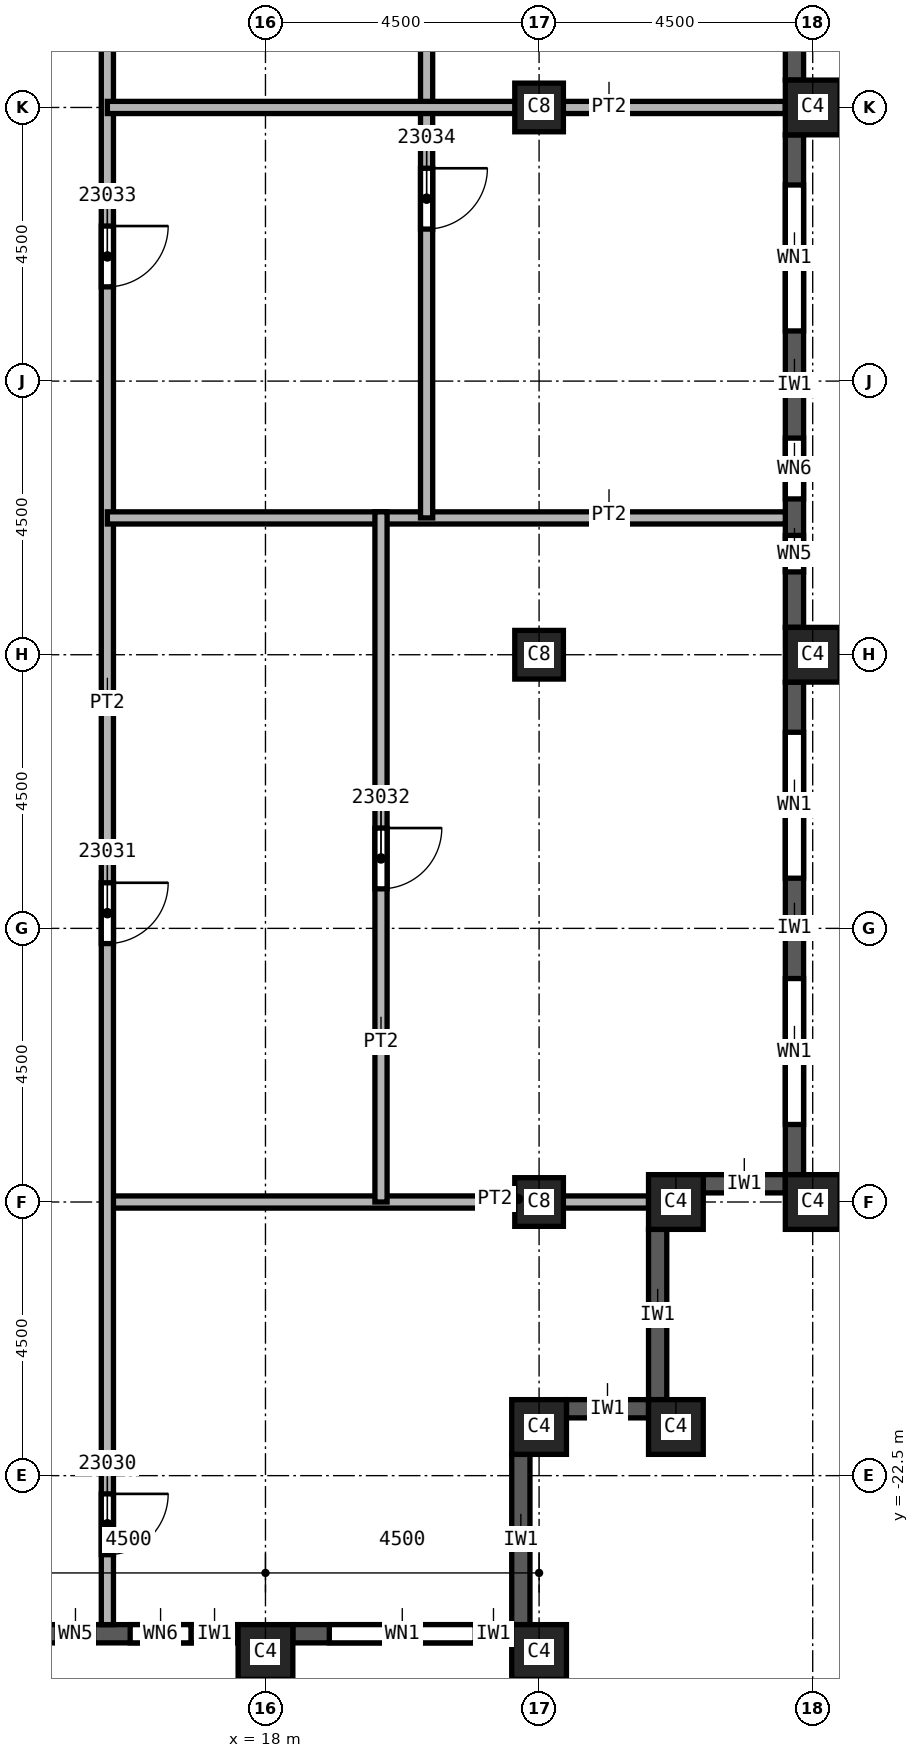
"""IFC4 building model, lengths in metres.
Left out: names, types, materials, properties, quantities, classifications, styles, units other than length and angle.
Written with IfcOpenShell. Run it as: python <this file> out.ifc"""

import sys

from ifc_helpers import new_model, si_unit, direction, frame, frame_2d, origin, origin_2d, place, context, subcontext, project, spatial, rectangle, extrude, element, fill, save


model = new_model("IFC4")
c1 = context("Model", 3, precision=1e-05, world=origin(), true_north=direction((0.0, 1.0)))
c2 = subcontext(c1, "Body", "Model", "MODEL_VIEW")
j1 = project(units=[si_unit("LENGTHUNIT", "METRE"), si_unit("PLANEANGLEUNIT", "RADIAN")], contexts=[c1])
p1 = place(None, origin())
s1 = spatial("IfcSite", under=j1, at=p1, CompositionType="ELEMENT")
p2 = place(p1, origin())
s2 = spatial("IfcBuilding", under=s1, at=p2, CompositionType="ELEMENT")
p3 = place(p2, frame((0.0, 0.0, 326.0)))
s3 = spatial("IfcBuildingStorey", under=s2, at=p3, CompositionType="ELEMENT", Elevation=326.0)
for number, where, z_axis, x_axis in (
    (1, (22.5, 0.0, 0.0), (0.0, 0.0, 1.0), (1.0, 0.0, 0.0)),
    (2, (22.5, -9.0, 0.0), (0.0, 0.0, 1.0), (1.0, 0.0, 0.0)),
    (3, (22.5, -18.0, 0.0), (0.0, 0.0, 1.0), (1.0, 0.0, 0.0)),
):
    element("IfcColumn", number, at=place(p3, frame(where, z_axis=z_axis, x_axis=x_axis)), inside=s3, PredefinedType="COLUMN", context=c2, shape_type="SweptSolid", body=[
        extrude(rectangle(XDim=0.8, YDim=0.8, at=origin_2d()), origin(), (0.0, 0.0, 1.0), 3.74),
    ])
for number, where, z_axis, x_axis in (
    (4, (27.0, 0.0, 0.0), (0.0, 0.0, 1.0), (0.0, 1.0, 0.0)),
    (5, (27.0, -9.0, 0.0), (0.0, 0.0, 1.0), (0.0, 1.0, 0.0)),
    (6, (27.0, -18.0, 0.0), (0.0, 0.0, 1.0), (0.0, 1.0, 0.0)),
    (7, (18.0, -25.4, 0.0), (0.0, 0.0, 1.0), (1.0, 0.0, 0.0)),
    (8, (22.5, -25.4, 0.0), (0.0, 0.0, 1.0), (1.0, 0.0, 0.0)),
    (9, (22.5, -21.7, 0.0), (0.0, 0.0, 1.0), (1.0, 0.0, 0.0)),
    (10, (24.75, -21.7, 0.0), (0.0, 0.0, 1.0), (1.0, 0.0, 0.0)),
    (11, (24.75, -18.0, 0.0), (0.0, 0.0, 1.0), (1.0, 0.0, 0.0)),
):
    element("IfcColumn", number, at=place(p3, frame(where, z_axis=z_axis, x_axis=x_axis)), inside=s3, PredefinedType="COLUMN", context=c2, shape_type="SweptSolid", body=[
        extrude(rectangle(XDim=0.9, YDim=0.9, at=origin_2d()), origin(), (0.0, 0.0, 1.0), 3.74),
    ])
p4 = place(p3, frame((13.95, -25.1, 0.0), z_axis=(0.0, 0.0, 1.0), x_axis=(1.0, 0.0, 0.0)))
e12 = element("IfcWall", 12, at=p4, inside=s3, PredefinedType="SOLIDWALL", context=c2, shape_type="SweptSolid", body=[
    extrude(rectangle(XDim=3.6, YDim=0.3, at=frame_2d((1.8, 0.0))), origin(), (0.0, 0.0, 1.0), 3.14),
])
p5 = place(p4, frame((0.625, 0.0, 0.8)))
e13 = element("IfcOpeningElement", 13, at=p5, cuts=e12, PredefinedType="OPENING", context=c2, shape_type="SweptSolid", body=[
    extrude(rectangle(XDim=0.6, YDim=1.95, at=frame_2d((0.3, 0.975))), frame((0.0, 0.15, 0.0), z_axis=(0.0, -1.0, 0.0), x_axis=(1.0, 0.0, 0.0)), (0.0, 0.0, 1.0), 0.3),
])
p6 = place(p4, frame((1.825, 0.0, 0.8)))
e14 = element("IfcOpeningElement", 14, at=p6, cuts=e12, PredefinedType="OPENING", context=c2, shape_type="SweptSolid", body=[
    extrude(rectangle(XDim=1.0, YDim=1.95, at=frame_2d((0.5, 0.975))), frame((0.0, 0.15, 0.0), z_axis=(0.0, -1.0, 0.0), x_axis=(1.0, 0.0, 0.0)), (0.0, 0.0, 1.0), 0.3),
])
p7 = place(p3, frame((18.45, -25.1, 0.0), z_axis=(0.0, 0.0, 1.0), x_axis=(1.0, 0.0, 0.0)))
e15 = element("IfcWall", 15, at=p7, inside=s3, PredefinedType="SOLIDWALL", context=c2, shape_type="SweptSolid", body=[
    extrude(rectangle(XDim=3.6, YDim=0.3, at=frame_2d((1.8, 0.0))), origin(), (0.0, 0.0, 1.0), 3.14),
])
p8 = place(p7, frame((0.6, 0.0, 0.8)))
e16 = element("IfcOpeningElement", 16, at=p8, cuts=e15, PredefinedType="OPENING", context=c2, shape_type="SweptSolid", body=[
    extrude(rectangle(XDim=2.4, YDim=1.95, at=frame_2d((1.2, 0.975))), frame((0.0, 0.15, 0.0), z_axis=(0.0, -1.0, 0.0), x_axis=(1.0, 0.0, 0.0)), (0.0, 0.0, 1.0), 0.3),
])
p9 = place(p3, frame((22.2, -24.95, 0.0), z_axis=(0.0, 0.0, 1.0), x_axis=(0.0, 1.0, 0.0)))
e17 = element("IfcWall", 17, at=p9, inside=s3, PredefinedType="SOLIDWALL", context=c2, shape_type="SweptSolid", body=[
    extrude(rectangle(XDim=2.8, YDim=0.3, at=frame_2d((1.4, 0.0))), origin(), (0.0, 0.0, 1.0), 3.14),
])
p10 = place(p3, frame((22.95, -21.4, 0.0), z_axis=(0.0, 0.0, 1.0), x_axis=(1.0, 0.0, 0.0)))
e18 = element("IfcWall", 18, at=p10, inside=s3, PredefinedType="SOLIDWALL", context=c2, shape_type="SweptSolid", body=[
    extrude(rectangle(XDim=1.35, YDim=0.3, at=frame_2d((0.675, 0.0))), origin(), (0.0, 0.0, 1.0), 3.14),
])
p11 = place(p3, frame((24.45, -21.25, 0.0), z_axis=(0.0, 0.0, 1.0), x_axis=(0.0, 1.0, 0.0)))
e19 = element("IfcWall", 19, at=p11, inside=s3, PredefinedType="SOLIDWALL", context=c2, shape_type="SweptSolid", body=[
    extrude(rectangle(XDim=2.8, YDim=0.3, at=frame_2d((1.4, 0.0))), origin(), (0.0, 0.0, 1.0), 3.14),
])
p12 = place(p3, frame((25.2, -17.7, 0.0), z_axis=(0.0, 0.0, 1.0), x_axis=(1.0, 0.0, 0.0)))
e20 = element("IfcWall", 20, at=p12, inside=s3, PredefinedType="SOLIDWALL", context=c2, shape_type="SweptSolid", body=[
    extrude(rectangle(XDim=1.35, YDim=0.3, at=frame_2d((0.675, 0.0))), origin(), (0.0, 0.0, 1.0), 3.14),
])
p13 = place(p3, frame((26.7, -17.55, 0.0), z_axis=(0.0, 0.0, 1.0), x_axis=(0.0, 1.0, 0.0)))
e21 = element("IfcWall", 21, at=p13, inside=s3, PredefinedType="SOLIDWALL", context=c2, shape_type="SweptSolid", body=[
    extrude(rectangle(XDim=8.1, YDim=0.3, at=frame_2d((4.05, 0.0))), origin(), (0.0, 0.0, 1.0), 3.14),
])
p14 = place(p13, frame((0.825, 0.0, 0.8)))
e22 = element("IfcOpeningElement", 22, at=p14, cuts=e21, PredefinedType="OPENING", context=c2, shape_type="SweptSolid", body=[
    extrude(rectangle(XDim=2.4, YDim=1.95, at=frame_2d((1.2, 0.975))), frame((0.0, 0.15, 0.0), z_axis=(0.0, -1.0, 0.0), x_axis=(1.0, 0.0, 0.0)), (0.0, 0.0, 1.0), 0.3),
])
p15 = place(p13, frame((4.875, 0.0, 0.8)))
e23 = element("IfcOpeningElement", 23, at=p15, cuts=e21, PredefinedType="OPENING", context=c2, shape_type="SweptSolid", body=[
    extrude(rectangle(XDim=2.4, YDim=1.95, at=frame_2d((1.2, 0.975))), frame((0.0, 0.15, 0.0), z_axis=(0.0, -1.0, 0.0), x_axis=(1.0, 0.0, 0.0)), (0.0, 0.0, 1.0), 0.3),
])
p16 = place(p3, frame((26.7, -8.55, 0.0), z_axis=(0.0, 0.0, 1.0), x_axis=(0.0, 1.0, 0.0)))
e24 = element("IfcWall", 24, at=p16, inside=s3, PredefinedType="SOLIDWALL", context=c2, shape_type="SweptSolid", body=[
    extrude(rectangle(XDim=8.1, YDim=0.3, at=frame_2d((4.05, 0.0))), origin(), (0.0, 0.0, 1.0), 3.14),
])
p17 = place(p16, frame((4.875, 0.0, 0.8)))
e25 = element("IfcOpeningElement", 25, at=p17, cuts=e24, PredefinedType="OPENING", context=c2, shape_type="SweptSolid", body=[
    extrude(rectangle(XDim=2.4, YDim=1.95, at=frame_2d((1.2, 0.975))), frame((0.0, 0.15, 0.0), z_axis=(0.0, -1.0, 0.0), x_axis=(1.0, 0.0, 0.0)), (0.0, 0.0, 1.0), 0.3),
])
p18 = place(p16, frame((0.913, 0.0, 0.8)))
e26 = element("IfcOpeningElement", 26, at=p18, cuts=e24, PredefinedType="OPENING", context=c2, shape_type="SweptSolid", body=[
    extrude(rectangle(XDim=0.6, YDim=1.95, at=frame_2d((0.3, 0.975))), frame((0.0, 0.15, 0.0), z_axis=(0.0, -1.0, 0.0), x_axis=(1.0, 0.0, 0.0)), (0.0, 0.0, 1.0), 0.3),
])
p19 = place(p16, frame((2.113, 0.0, 0.8)))
e27 = element("IfcOpeningElement", 27, at=p19, cuts=e24, PredefinedType="OPENING", context=c2, shape_type="SweptSolid", body=[
    extrude(rectangle(XDim=1.0, YDim=1.95, at=frame_2d((0.5, 0.975))), frame((0.0, 0.15, 0.0), z_axis=(0.0, -1.0, 0.0), x_axis=(1.0, 0.0, 0.0)), (0.0, 0.0, 1.0), 0.3),
])
p20 = place(p3, frame((26.7, 0.45, 0.0), z_axis=(0.0, 0.0, 1.0), x_axis=(0.0, 1.0, 0.0)))
e28 = element("IfcWall", 28, at=p20, inside=s3, PredefinedType="SOLIDWALL", context=c2, shape_type="SweptSolid", body=[
    extrude(rectangle(XDim=8.1, YDim=0.3, at=frame_2d((4.05, 0.0))), origin(), (0.0, 0.0, 1.0), 3.14),
])
p21 = place(p20, frame((0.825, 0.0, 0.8)))
e29 = element("IfcOpeningElement", 29, at=p21, cuts=e28, PredefinedType="OPENING", context=c2, shape_type="SweptSolid", body=[
    extrude(rectangle(XDim=2.4, YDim=1.95, at=frame_2d((1.2, 0.975))), frame((0.0, 0.15, 0.0), z_axis=(0.0, -1.0, 0.0), x_axis=(1.0, 0.0, 0.0)), (0.0, 0.0, 1.0), 0.3),
])
p22 = place(p20, frame((4.875, 0.0, 0.8)))
e30 = element("IfcOpeningElement", 30, at=p22, cuts=e28, PredefinedType="OPENING", context=c2, shape_type="SweptSolid", body=[
    extrude(rectangle(XDim=2.4, YDim=1.95, at=frame_2d((1.2, 0.975))), frame((0.0, 0.15, 0.0), z_axis=(0.0, -1.0, 0.0), x_axis=(1.0, 0.0, 0.0)), (0.0, 0.0, 1.0), 0.3),
])
p23 = place(p3, frame((15.4, -18.0, 0.0), z_axis=(0.0, 0.0, 1.0), x_axis=(1.0, 0.0, 0.0)))
e31 = element("IfcWall", 31, at=p23, inside=s3, PredefinedType="PARTITIONING", context=c2, shape_type="SweptSolid", body=[
    extrude(rectangle(XDim=8.9, YDim=0.2, at=frame_2d((4.45, 0.0))), origin(), (0.0, 0.0, 1.0), 3.74),
])
p24 = place(p3, frame((15.4, 8.7, 0.0), z_axis=(0.0, 0.0, 1.0), x_axis=(0.0, -1.0, 0.0)))
e32 = element("IfcWall", 32, at=p24, inside=s3, PredefinedType="PARTITIONING", context=c2, shape_type="SweptSolid", body=[
    extrude(rectangle(XDim=33.65, YDim=0.2, at=frame_2d((16.825, 0.0))), origin(), (0.0, 0.0, 1.0), 3.74),
])
p25 = place(p24, frame((1.15, 0.0, 0.0)))
e33 = element("IfcOpeningElement", 33, at=p25, cuts=e32, PredefinedType="OPENING", context=c2, shape_type="SweptSolid", body=[
    extrude(rectangle(XDim=1.0, YDim=2.1, at=frame_2d((0.5, 1.05))), frame((0.0, 0.1, 0.0), z_axis=(0.0, -1.0, 0.0), x_axis=(1.0, 0.0, 0.0)), (0.0, 0.0, 1.0), 0.2),
])
p26 = place(p24, frame((31.5, 0.0, 0.0)))
e34 = element("IfcOpeningElement", 34, at=p26, cuts=e32, PredefinedType="OPENING", context=c2, shape_type="SweptSolid", body=[
    extrude(rectangle(XDim=1.0, YDim=2.1, at=frame_2d((0.5, 1.05))), frame((0.0, 0.1, 0.0), z_axis=(0.0, -1.0, 0.0), x_axis=(1.0, 0.0, 0.0)), (0.0, 0.0, 1.0), 0.2),
])
p27 = place(p24, frame((21.45, 0.0, 0.0)))
e35 = element("IfcOpeningElement", 35, at=p27, cuts=e32, PredefinedType="OPENING", context=c2, shape_type="SweptSolid", body=[
    extrude(rectangle(XDim=1.0, YDim=2.1, at=frame_2d((0.5, 1.05))), frame((0.0, 0.1, 0.0), z_axis=(0.0, -1.0, 0.0), x_axis=(1.0, 0.0, 0.0)), (0.0, 0.0, 1.0), 0.2),
])
p28 = place(p24, frame((10.65, 0.0, 0.0)))
e36 = element("IfcOpeningElement", 36, at=p28, cuts=e32, PredefinedType="OPENING", context=c2, shape_type="SweptSolid", body=[
    extrude(rectangle(XDim=1.0, YDim=2.1, at=frame_2d((0.5, 1.05))), frame((0.0, 0.1, 0.0), z_axis=(0.0, -1.0, 0.0), x_axis=(1.0, 0.0, 0.0)), (0.0, 0.0, 1.0), 0.2),
])
p29 = place(p3, frame((15.4, -6.75, 0.0), z_axis=(0.0, 0.0, 1.0), x_axis=(1.0, 0.0, 0.0)))
e37 = element("IfcWall", 37, at=p29, inside=s3, PredefinedType="PARTITIONING", context=c2, shape_type="SweptSolid", body=[
    extrude(rectangle(XDim=11.15, YDim=0.2, at=frame_2d((5.575, 0.0))), origin(), (0.0, 0.0, 1.0), 3.74),
])
p30 = place(p3, frame((19.9, -6.65, 0.0), z_axis=(0.0, 0.0, 1.0), x_axis=(0.0, -1.0, 0.0)))
e38 = element("IfcWall", 38, at=p30, inside=s3, PredefinedType="PARTITIONING", context=c2, shape_type="SweptSolid", body=[
    extrude(rectangle(XDim=11.35, YDim=0.2, at=frame_2d((5.675, 0.0))), origin(), (0.0, 0.0, 1.0), 3.74),
])
p31 = place(p30, frame((5.2, 0.0, 0.0)))
e39 = element("IfcOpeningElement", 39, at=p31, cuts=e38, PredefinedType="OPENING", context=c2, shape_type="SweptSolid", body=[
    extrude(rectangle(XDim=1.0, YDim=2.1, at=frame_2d((0.5, 1.05))), frame((0.0, 0.1, 0.0), z_axis=(0.0, -1.0, 0.0), x_axis=(1.0, 0.0, 0.0)), (0.0, 0.0, 1.0), 0.2),
])
p32 = place(p3, frame((20.65, 8.7, 0.0), z_axis=(0.0, 0.0, 1.0), x_axis=(0.0, -1.0, 0.0)))
e40 = element("IfcWall", 40, at=p32, inside=s3, PredefinedType="PARTITIONING", context=c2, shape_type="SweptSolid", body=[
    extrude(rectangle(XDim=15.45, YDim=0.2, at=frame_2d((7.725, 0.0))), origin(), (0.0, 0.0, 1.0), 3.74),
])
p33 = place(p32, frame((6.55, 0.0, 0.0)))
e41 = element("IfcOpeningElement", 41, at=p33, cuts=e40, PredefinedType="OPENING", context=c2, shape_type="SweptSolid", body=[
    extrude(rectangle(XDim=1.0, YDim=2.1, at=frame_2d((0.5, 1.05))), frame((0.0, 0.1, 0.0), z_axis=(0.0, -1.0, 0.0), x_axis=(1.0, 0.0, 0.0)), (0.0, 0.0, 1.0), 0.2),
])
p34 = place(p32, frame((9.7, 0.0, 0.0)))
e42 = element("IfcOpeningElement", 42, at=p34, cuts=e40, PredefinedType="OPENING", context=c2, shape_type="SweptSolid", body=[
    extrude(rectangle(XDim=1.0, YDim=2.1, at=frame_2d((0.5, 1.05))), frame((0.0, 0.1, 0.0), z_axis=(0.0, -1.0, 0.0), x_axis=(1.0, 0.0, 0.0)), (0.0, 0.0, 1.0), 0.2),
])
p35 = place(p3, frame((26.55, 0.0, 0.0), z_axis=(0.0, 0.0, 1.0), x_axis=(-1.0, 0.0, 0.0)))
e43 = element("IfcWall", 43, at=p35, inside=s3, PredefinedType="PARTITIONING", context=c2, shape_type="SweptSolid", body=[
    extrude(rectangle(XDim=11.15, YDim=0.2, at=frame_2d((5.575, 0.0))), origin(), (0.0, 0.0, 1.0), 3.74),
])
p36 = place(p8, origin())
e44 = element("IfcWindow", 44, at=p36, inside=s3, PartitioningType="SINGLE_PANEL", PredefinedType="WINDOW", context=c2, shape_type="SweptSolid", body=[
    extrude(rectangle(XDim=2.4, YDim=1.95, at=frame_2d((1.2, 0.975))), frame((0.0, 0.03, 0.0), z_axis=(0.0, -1.0, 0.0), x_axis=(1.0, 0.0, 0.0)), (0.0, 0.0, 1.0), 0.06),
])
fill(e16, e44)
p37 = place(p14, origin())
e45 = element("IfcWindow", 45, at=p37, inside=s3, PartitioningType="SINGLE_PANEL", PredefinedType="WINDOW", context=c2, shape_type="SweptSolid", body=[
    extrude(rectangle(XDim=2.4, YDim=1.95, at=frame_2d((1.2, 0.975))), frame((0.0, 0.03, 0.0), z_axis=(0.0, -1.0, 0.0), x_axis=(1.0, 0.0, 0.0)), (0.0, 0.0, 1.0), 0.06),
])
fill(e22, e45)
p38 = place(p15, origin())
e46 = element("IfcWindow", 46, at=p38, inside=s3, PartitioningType="SINGLE_PANEL", PredefinedType="WINDOW", context=c2, shape_type="SweptSolid", body=[
    extrude(rectangle(XDim=2.4, YDim=1.95, at=frame_2d((1.2, 0.975))), frame((0.0, 0.03, 0.0), z_axis=(0.0, -1.0, 0.0), x_axis=(1.0, 0.0, 0.0)), (0.0, 0.0, 1.0), 0.06),
])
fill(e23, e46)
p39 = place(p17, origin())
e47 = element("IfcWindow", 47, at=p39, inside=s3, PartitioningType="SINGLE_PANEL", PredefinedType="WINDOW", context=c2, shape_type="SweptSolid", body=[
    extrude(rectangle(XDim=2.4, YDim=1.95, at=frame_2d((1.2, 0.975))), frame((0.0, 0.03, 0.0), z_axis=(0.0, -1.0, 0.0), x_axis=(1.0, 0.0, 0.0)), (0.0, 0.0, 1.0), 0.06),
])
fill(e25, e47)
p40 = place(p26, origin())
e48 = element("IfcDoor", 48, at=p40, inside=s3, OperationType="SINGLE_SWING_LEFT", PredefinedType="DOOR", context=c2, shape_type="SweptSolid", body=[
    extrude(rectangle(XDim=1.0, YDim=2.1, at=frame_2d((0.5, 1.05))), frame((0.0, 0.025, 0.0), z_axis=(0.0, -1.0, 0.0), x_axis=(1.0, 0.0, 0.0)), (0.0, 0.0, 1.0), 0.05),
])
fill(e34, e48)
p41 = place(p27, origin())
e49 = element("IfcDoor", 49, at=p41, inside=s3, OperationType="SINGLE_SWING_RIGHT", PredefinedType="DOOR", context=c2, shape_type="SweptSolid", body=[
    extrude(rectangle(XDim=1.0, YDim=2.1, at=frame_2d((0.5, 1.05))), frame((0.0, 0.025, 0.0), z_axis=(0.0, -1.0, 0.0), x_axis=(1.0, 0.0, 0.0)), (0.0, 0.0, 1.0), 0.05),
])
fill(e35, e49)
p42 = place(p31, origin())
e50 = element("IfcDoor", 50, at=p42, inside=s3, OperationType="SINGLE_SWING_LEFT", PredefinedType="DOOR", context=c2, shape_type="SweptSolid", body=[
    extrude(rectangle(XDim=1.0, YDim=2.1, at=frame_2d((0.5, 1.05))), frame((0.0, 0.025, 0.0), z_axis=(0.0, -1.0, 0.0), x_axis=(1.0, 0.0, 0.0)), (0.0, 0.0, 1.0), 0.05),
])
fill(e39, e50)
p43 = place(p28, origin())
e51 = element("IfcDoor", 51, at=p43, inside=s3, OperationType="SINGLE_SWING_RIGHT", PredefinedType="DOOR", context=c2, shape_type="SweptSolid", body=[
    extrude(rectangle(XDim=1.0, YDim=2.1, at=frame_2d((0.5, 1.05))), frame((0.0, 0.025, 0.0), z_axis=(0.0, -1.0, 0.0), x_axis=(1.0, 0.0, 0.0)), (0.0, 0.0, 1.0), 0.05),
])
fill(e36, e51)
p44 = place(p34, origin())
e52 = element("IfcDoor", 52, at=p44, inside=s3, OperationType="SINGLE_SWING_LEFT", PredefinedType="DOOR", context=c2, shape_type="SweptSolid", body=[
    extrude(rectangle(XDim=1.0, YDim=2.1, at=frame_2d((0.5, 1.05))), frame((0.0, 0.025, 0.0), z_axis=(0.0, -1.0, 0.0), x_axis=(1.0, 0.0, 0.0)), (0.0, 0.0, 1.0), 0.05),
])
fill(e42, e52)
p45 = place(p5, origin())
e53 = element("IfcWindow", 53, at=p45, inside=s3, PartitioningType="SINGLE_PANEL", PredefinedType="WINDOW", context=c2, shape_type="SweptSolid", body=[
    extrude(rectangle(XDim=0.6, YDim=1.95, at=frame_2d((0.3, 0.975))), frame((0.0, 0.03, 0.0), z_axis=(0.0, -1.0, 0.0), x_axis=(1.0, 0.0, 0.0)), (0.0, 0.0, 1.0), 0.06),
])
fill(e13, e53)
p46 = place(p6, origin())
e54 = element("IfcWindow", 54, at=p46, inside=s3, PartitioningType="SINGLE_PANEL", PredefinedType="WINDOW", context=c2, shape_type="SweptSolid", body=[
    extrude(rectangle(XDim=1.0, YDim=1.95, at=frame_2d((0.5, 0.975))), frame((0.0, 0.03, 0.0), z_axis=(0.0, -1.0, 0.0), x_axis=(1.0, 0.0, 0.0)), (0.0, 0.0, 1.0), 0.06),
])
fill(e14, e54)
p47 = place(p18, origin())
e55 = element("IfcWindow", 55, at=p47, inside=s3, PartitioningType="SINGLE_PANEL", PredefinedType="WINDOW", context=c2, shape_type="SweptSolid", body=[
    extrude(rectangle(XDim=0.6, YDim=1.95, at=frame_2d((0.3, 0.975))), frame((0.0, 0.03, 0.0), z_axis=(0.0, -1.0, 0.0), x_axis=(1.0, 0.0, 0.0)), (0.0, 0.0, 1.0), 0.06),
])
fill(e26, e55)
p48 = place(p19, origin())
e56 = element("IfcWindow", 56, at=p48, inside=s3, PartitioningType="SINGLE_PANEL", PredefinedType="WINDOW", context=c2, shape_type="SweptSolid", body=[
    extrude(rectangle(XDim=1.0, YDim=1.95, at=frame_2d((0.5, 0.975))), frame((0.0, 0.03, 0.0), z_axis=(0.0, -1.0, 0.0), x_axis=(1.0, 0.0, 0.0)), (0.0, 0.0, 1.0), 0.06),
])
fill(e27, e56)
save(model, sys.argv[1])
